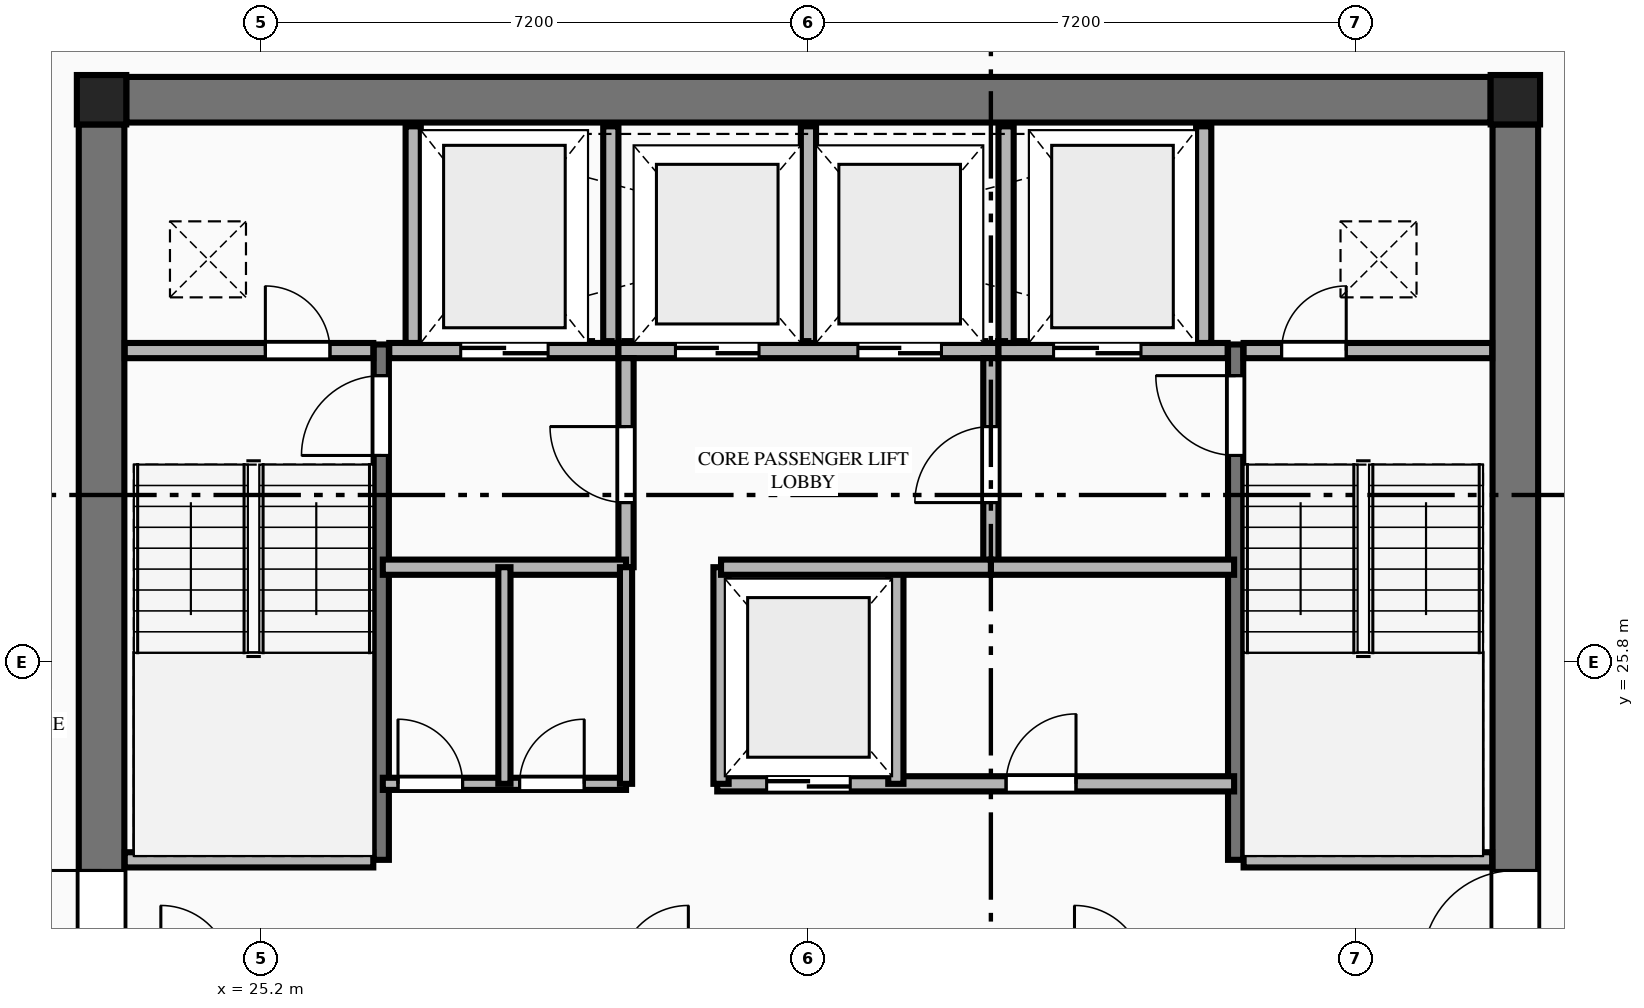
"""IFC4 building model, lengths in metres.
Left out: names, types, materials, properties, quantities, classifications, styles, units other than length and angle.
Written with IfcOpenShell. Run it as: python <this file> out.ifc"""

import sys

from ifc_helpers import new_model, si_unit, direction, frame, frame_2d, origin, origin_2d, place, context, subcontext, project, spatial, rectangle, extrude, element, fill, save


model = new_model("IFC4")
c1 = context("Model", 3, precision=1e-05, world=origin(), true_north=direction((0.0, 1.0)))
c2 = subcontext(c1, "Body", "Model", "MODEL_VIEW")
j1 = project(units=[si_unit("LENGTHUNIT", "METRE"), si_unit("PLANEANGLEUNIT", "RADIAN")], contexts=[c1])
p1 = place(None, origin())
s1 = spatial("IfcSite", under=j1, at=p1, CompositionType="ELEMENT")
p2 = place(p1, origin())
s2 = spatial("IfcBuilding", under=s1, at=p2, CompositionType="ELEMENT")
p3 = place(p2, frame((0.0, 0.0, 196.75)))
s3 = spatial("IfcBuildingStorey", under=s2, at=p3, CompositionType="ELEMENT", Elevation=196.75)
for number, where, z_axis, x_axis in (
    (1, (41.7, 33.2, 0.0), (0.0, 0.0, 1.0), (1.0, 0.0, 0.0)),
    (2, (23.1, 33.2, 0.0), (0.0, 0.0, 1.0), (1.0, 0.0, 0.0)),
):
    element("IfcColumn", number, at=place(p3, frame(where, z_axis=z_axis, x_axis=x_axis)), inside=s3, PredefinedType="COLUMN", context=c2, shape_type="SweptSolid", body=[
        extrude(rectangle(XDim=0.65, YDim=0.65, at=origin_2d()), origin(), (0.0, 0.0, 1.0), 3.55),
    ])
p4 = place(p3, frame((23.425, 33.2, 0.0), z_axis=(0.0, 0.0, 1.0), x_axis=(1.0, 0.0, 0.0)))
e3 = element("IfcWall", 3, at=p4, inside=s3, PredefinedType="SHEAR", context=c2, shape_type="SweptSolid", body=[
    extrude(rectangle(XDim=17.95, YDim=0.6, at=frame_2d((8.975, 0.0))), origin(), (0.0, 0.0, 1.0), 3.35),
])
p5 = place(p3, frame((23.1, 18.925, 0.0), z_axis=(0.0, 0.0, 1.0), x_axis=(0.0, 1.0, 0.0)))
e4 = element("IfcWall", 4, at=p5, inside=s3, PredefinedType="SHEAR", context=c2, shape_type="SweptSolid", body=[
    extrude(rectangle(XDim=13.95, YDim=0.6, at=frame_2d((6.975, 0.0))), origin(), (0.0, 0.0, 1.0), 3.35),
])
p6 = place(p5, frame((2.915, 0.0, 0.0)))
e5 = element("IfcOpeningElement", 5, at=p6, cuts=e4, PredefinedType="OPENING", context=c2, shape_type="SweptSolid", body=[
    extrude(rectangle(XDim=1.22, YDim=2.25, at=frame_2d((0.61, 1.125))), frame((0.0, 0.31, 0.0), z_axis=(0.0, -1.0, 0.0), x_axis=(1.0, 0.0, 0.0)), (0.0, 0.0, 1.0), 0.62),
])
p7 = place(p3, frame((41.7, 18.925, 0.0), z_axis=(0.0, 0.0, 1.0), x_axis=(0.0, 1.0, 0.0)))
e6 = element("IfcWall", 6, at=p7, inside=s3, PredefinedType="SHEAR", context=c2, shape_type="SweptSolid", body=[
    extrude(rectangle(XDim=13.95, YDim=0.6, at=frame_2d((6.975, 0.0))), origin(), (0.0, 0.0, 1.0), 3.35),
])
p8 = place(p7, frame((2.915, 0.0, 0.0)))
e7 = element("IfcOpeningElement", 7, at=p8, cuts=e6, PredefinedType="OPENING", context=c2, shape_type="SweptSolid", body=[
    extrude(rectangle(XDim=1.22, YDim=2.25, at=frame_2d((0.61, 1.125))), frame((0.0, 0.31, 0.0), z_axis=(0.0, -1.0, 0.0), x_axis=(1.0, 0.0, 0.0)), (0.0, 0.0, 1.0), 0.62),
])
p9 = place(p3, frame((26.78, 23.2, 0.0), z_axis=(0.0, 0.0, 1.0), x_axis=(0.0, 1.0, 0.0)))
e8 = element("IfcWall", 8, at=p9, inside=s3, PredefinedType="SHEAR", context=c2, shape_type="SweptSolid", body=[
    extrude(rectangle(XDim=6.78, YDim=0.2, at=frame_2d((3.39, 0.0))), origin(), (0.0, 0.0, 1.0), 3.55),
])
p10 = place(p9, frame((5.32, 0.0, 0.0)))
e9 = element("IfcOpeningElement", 9, at=p10, cuts=e8, PredefinedType="OPENING", context=c2, shape_type="SweptSolid", body=[
    extrude(rectangle(XDim=1.05, YDim=2.15, at=frame_2d((0.525, 1.075))), frame((0.0, 0.11, 0.0), z_axis=(0.0, -1.0, 0.0), x_axis=(1.0, 0.0, 0.0)), (0.0, 0.0, 1.0), 0.22),
])
p11 = place(p3, frame((23.405, 23.2, 0.0), z_axis=(0.0, 0.0, 1.0), x_axis=(1.0, 0.0, 0.0)))
e10 = element("IfcWall", 10, at=p11, inside=s3, PredefinedType="PLUMBINGWALL", context=c2, shape_type="SweptSolid", body=[
    extrude(rectangle(XDim=3.27, YDim=0.2, at=frame_2d((1.635, 0.0))), origin(), (0.0, 0.0, 1.0), 3.35),
])
p12 = place(p3, frame((38.02, 23.2, 0.0), z_axis=(0.0, 0.0, 1.0), x_axis=(0.0, 1.0, 0.0)))
e11 = element("IfcWall", 11, at=p12, inside=s3, PredefinedType="SHEAR", context=c2, shape_type="SweptSolid", body=[
    extrude(rectangle(XDim=6.78, YDim=0.2, at=frame_2d((3.39, 0.0))), origin(), (0.0, 0.0, 1.0), 3.55),
])
p13 = place(p12, frame((5.32, 0.0, 0.0)))
e12 = element("IfcOpeningElement", 12, at=p13, cuts=e11, PredefinedType="OPENING", context=c2, shape_type="SweptSolid", body=[
    extrude(rectangle(XDim=1.05, YDim=2.15, at=frame_2d((0.525, 1.075))), frame((0.0, 0.11, 0.0), z_axis=(0.0, -1.0, 0.0), x_axis=(1.0, 0.0, 0.0)), (0.0, 0.0, 1.0), 0.22),
])
p14 = place(p3, frame((38.125, 23.2, 0.0), z_axis=(0.0, 0.0, 1.0), x_axis=(1.0, 0.0, 0.0)))
e13 = element("IfcWall", 13, at=p14, inside=s3, PredefinedType="PLUMBINGWALL", context=c2, shape_type="SweptSolid", body=[
    extrude(rectangle(XDim=3.27, YDim=0.2, at=frame_2d((1.635, 0.0))), origin(), (0.0, 0.0, 1.0), 3.35),
])
p15 = place(p3, frame((23.405, 29.9, 0.0), z_axis=(0.0, 0.0, 1.0), x_axis=(1.0, 0.0, 0.0)))
e14 = element("IfcWall", 14, at=p15, inside=s3, PredefinedType="PLUMBINGWALL", context=c2, shape_type="SweptSolid", body=[
    extrude(rectangle(XDim=3.27, YDim=0.2, at=frame_2d((1.635, 0.0))), origin(), (0.0, 0.0, 1.0), 3.35),
])
p16 = place(p15, frame((1.85, 0.0, 0.0)))
e15 = element("IfcOpeningElement", 15, at=p16, cuts=e14, PredefinedType="OPENING", context=c2, shape_type="SweptSolid", body=[
    extrude(rectangle(XDim=0.85, YDim=2.05, at=frame_2d((0.425, 1.025))), frame((0.0, 0.11, 0.0), z_axis=(0.0, -1.0, 0.0), x_axis=(1.0, 0.0, 0.0)), (0.0, 0.0, 1.0), 0.22),
])
p17 = place(p3, frame((26.885, 29.9, 0.0), z_axis=(0.0, 0.0, 1.0), x_axis=(1.0, 0.0, 0.0)))
e16 = element("IfcWall", 16, at=p17, inside=s3, PredefinedType="PLUMBINGWALL", context=c2, shape_type="SweptSolid", body=[
    extrude(rectangle(XDim=3.015, YDim=0.2, at=frame_2d((1.507, 0.0))), origin(), (0.0, 0.0, 1.0), 3.35),
])
p18 = place(p17, frame((0.94, 0.0, 0.0)))
e17 = element("IfcOpeningElement", 17, at=p18, cuts=e16, PredefinedType="OPENING", context=c2, shape_type="SweptSolid", body=[
    extrude(rectangle(XDim=1.15, YDim=2.2, at=frame_2d((0.575, 1.1))), frame((0.0, 0.11, 0.0), z_axis=(0.0, -1.0, 0.0), x_axis=(1.0, 0.0, 0.0)), (0.0, 0.0, 1.0), 0.22),
])
p19 = place(p3, frame((29.9, 29.9, 0.0), z_axis=(0.0, 0.0, 1.0), x_axis=(1.0, 0.0, 0.0)))
e18 = element("IfcWall", 18, at=p19, inside=s3, PredefinedType="PLUMBINGWALL", context=c2, shape_type="SweptSolid", body=[
    extrude(rectangle(XDim=5.0, YDim=0.2, at=frame_2d((2.5, 0.0))), origin(), (0.0, 0.0, 1.0), 3.35),
])
p20 = place(p19, frame((0.75, 0.0, 0.0)))
e19 = element("IfcOpeningElement", 19, at=p20, cuts=e18, PredefinedType="OPENING", context=c2, shape_type="SweptSolid", body=[
    extrude(rectangle(XDim=1.1, YDim=2.2, at=frame_2d((0.55, 1.1))), frame((0.0, 0.11, 0.0), z_axis=(0.0, -1.0, 0.0), x_axis=(1.0, 0.0, 0.0)), (0.0, 0.0, 1.0), 0.22),
])
p21 = place(p19, frame((3.15, 0.0, 0.0)))
e20 = element("IfcOpeningElement", 20, at=p21, cuts=e18, PredefinedType="OPENING", context=c2, shape_type="SweptSolid", body=[
    extrude(rectangle(XDim=1.1, YDim=2.2, at=frame_2d((0.55, 1.1))), frame((0.0, 0.11, 0.0), z_axis=(0.0, -1.0, 0.0), x_axis=(1.0, 0.0, 0.0)), (0.0, 0.0, 1.0), 0.22),
])
p22 = place(p3, frame((34.9, 29.9, 0.0), z_axis=(0.0, 0.0, 1.0), x_axis=(1.0, 0.0, 0.0)))
e21 = element("IfcWall", 21, at=p22, inside=s3, PredefinedType="PLUMBINGWALL", context=c2, shape_type="SweptSolid", body=[
    extrude(rectangle(XDim=3.015, YDim=0.2, at=frame_2d((1.508, 0.0))), origin(), (0.0, 0.0, 1.0), 3.35),
])
p23 = place(p22, frame((0.725, 0.0, 0.0)))
e22 = element("IfcOpeningElement", 22, at=p23, cuts=e21, PredefinedType="OPENING", context=c2, shape_type="SweptSolid", body=[
    extrude(rectangle(XDim=1.15, YDim=2.2, at=frame_2d((0.575, 1.1))), frame((0.0, 0.11, 0.0), z_axis=(0.0, -1.0, 0.0), x_axis=(1.0, 0.0, 0.0)), (0.0, 0.0, 1.0), 0.22),
])
p24 = place(p3, frame((38.125, 29.9, 0.0), z_axis=(0.0, 0.0, 1.0), x_axis=(1.0, 0.0, 0.0)))
e23 = element("IfcWall", 23, at=p24, inside=s3, PredefinedType="PLUMBINGWALL", context=c2, shape_type="SweptSolid", body=[
    extrude(rectangle(XDim=3.27, YDim=0.2, at=frame_2d((1.635, 0.0))), origin(), (0.0, 0.0, 1.0), 3.35),
])
p25 = place(p24, frame((0.5, 0.0, 0.0)))
e24 = element("IfcOpeningElement", 24, at=p25, cuts=e23, PredefinedType="OPENING", context=c2, shape_type="SweptSolid", body=[
    extrude(rectangle(XDim=0.85, YDim=2.05, at=frame_2d((0.425, 1.025))), frame((0.0, 0.11, 0.0), z_axis=(0.0, -1.0, 0.0), x_axis=(1.0, 0.0, 0.0)), (0.0, 0.0, 1.0), 0.22),
])
for number, where, z_axis, x_axis in (
    (25, (27.2, 30.0, 0.0), (0.0, 0.0, 1.0), (0.0, 1.0, 0.0)),
    (26, (29.8, 30.0, 0.0), (0.0, 0.0, 1.0), (0.0, 1.0, 0.0)),
    (27, (32.4, 30.0, 0.0), (0.0, 0.0, 1.0), (0.0, 1.0, 0.0)),
    (28, (35.0, 30.0, 0.0), (0.0, 0.0, 1.0), (0.0, 1.0, 0.0)),
    (29, (37.6, 30.0, 0.0), (0.0, 0.0, 1.0), (0.0, 1.0, 0.0)),
):
    element("IfcWall", number, at=place(p3, frame(where, z_axis=z_axis, x_axis=x_axis)), inside=s3, PredefinedType="PLUMBINGWALL", context=c2, shape_type="SweptSolid", body=[
        extrude(rectangle(XDim=2.85, YDim=0.2, at=frame_2d((1.425, 0.0))), origin(), (0.0, 0.0, 1.0), 3.35),
    ])
p26 = place(p3, frame((30.0, 27.05, 0.0), z_axis=(0.0, 0.0, 1.0), x_axis=(0.0, 1.0, 0.0)))
e30 = element("IfcWall", 30, at=p26, inside=s3, PredefinedType="PLUMBINGWALL", context=c2, shape_type="SweptSolid", body=[
    extrude(rectangle(XDim=2.75, YDim=0.2, at=frame_2d((1.375, 0.0))), origin(), (0.0, 0.0, 1.0), 3.35),
])
p27 = place(p26, frame((0.85, 0.0, 0.0)))
e31 = element("IfcOpeningElement", 31, at=p27, cuts=e30, PredefinedType="OPENING", context=c2, shape_type="SweptSolid", body=[
    extrude(rectangle(XDim=1.0, YDim=2.15, at=frame_2d((0.5, 1.075))), frame((0.0, 0.11, 0.0), z_axis=(0.0, -1.0, 0.0), x_axis=(1.0, 0.0, 0.0)), (0.0, 0.0, 1.0), 0.22),
])
p28 = place(p3, frame((26.8, 27.05, 0.0), z_axis=(0.0, 0.0, 1.0), x_axis=(1.0, 0.0, 0.0)))
e32 = element("IfcWall", 32, at=p28, inside=s3, PredefinedType="PLUMBINGWALL", context=c2, shape_type="SweptSolid", body=[
    extrude(rectangle(XDim=3.2, YDim=0.2, at=frame_2d((1.6, 0.0))), origin(), (0.0, 0.0, 1.0), 3.35),
])
p29 = place(p3, frame((34.8, 27.05, 0.0), z_axis=(0.0, 0.0, 1.0), x_axis=(0.0, 1.0, 0.0)))
e33 = element("IfcWall", 33, at=p29, inside=s3, PredefinedType="PLUMBINGWALL", context=c2, shape_type="SweptSolid", body=[
    extrude(rectangle(XDim=2.75, YDim=0.2, at=frame_2d((1.375, 0.0))), origin(), (0.0, 0.0, 1.0), 3.35),
])
p30 = place(p29, frame((0.85, 0.0, 0.0)))
e34 = element("IfcOpeningElement", 34, at=p30, cuts=e33, PredefinedType="OPENING", context=c2, shape_type="SweptSolid", body=[
    extrude(rectangle(XDim=1.0, YDim=2.15, at=frame_2d((0.5, 1.075))), frame((0.0, 0.11, 0.0), z_axis=(0.0, -1.0, 0.0), x_axis=(1.0, 0.0, 0.0)), (0.0, 0.0, 1.0), 0.22),
])
p31 = place(p3, frame((34.8, 27.05, 0.0), z_axis=(0.0, 0.0, 1.0), x_axis=(1.0, 0.0, 0.0)))
e35 = element("IfcWall", 35, at=p31, inside=s3, PredefinedType="PLUMBINGWALL", context=c2, shape_type="SweptSolid", body=[
    extrude(rectangle(XDim=3.2, YDim=0.2, at=frame_2d((1.6, 0.0))), origin(), (0.0, 0.0, 1.0), 3.35),
])
p32 = place(p3, frame((26.8, 24.2, 0.0), z_axis=(0.0, 0.0, 1.0), x_axis=(1.0, 0.0, 0.0)))
e36 = element("IfcWall", 36, at=p32, inside=s3, PredefinedType="PARTITIONING", context=c2, shape_type="SweptSolid", body=[
    extrude(rectangle(XDim=3.2, YDim=0.16, at=frame_2d((1.6, 0.0))), origin(), (0.0, 0.0, 1.0), 3.35),
])
p33 = place(p32, frame((0.2, 0.0, 0.0)))
e37 = element("IfcOpeningElement", 37, at=p33, cuts=e36, PredefinedType="OPENING", context=c2, shape_type="SweptSolid", body=[
    extrude(rectangle(XDim=0.85, YDim=2.05, at=frame_2d((0.425, 1.025))), frame((0.0, 0.09, 0.0), z_axis=(0.0, -1.0, 0.0), x_axis=(1.0, 0.0, 0.0)), (0.0, 0.0, 1.0), 0.18),
])
p34 = place(p32, frame((1.8, 0.0, 0.0)))
e38 = element("IfcOpeningElement", 38, at=p34, cuts=e36, PredefinedType="OPENING", context=c2, shape_type="SweptSolid", body=[
    extrude(rectangle(XDim=0.85, YDim=2.05, at=frame_2d((0.425, 1.025))), frame((0.0, 0.09, 0.0), z_axis=(0.0, -1.0, 0.0), x_axis=(1.0, 0.0, 0.0)), (0.0, 0.0, 1.0), 0.18),
])
p35 = place(p3, frame((30.0, 24.2, 0.0), z_axis=(0.0, 0.0, 1.0), x_axis=(0.0, 1.0, 0.0)))
e39 = element("IfcWall", 39, at=p35, inside=s3, PredefinedType="PARTITIONING", context=c2, shape_type="SweptSolid", body=[
    extrude(rectangle(XDim=2.85, YDim=0.16, at=frame_2d((1.425, 0.0))), origin(), (0.0, 0.0, 1.0), 3.35),
])
p36 = place(p3, frame((31.2, 24.2, 0.0), z_axis=(0.0, 0.0, 1.0), x_axis=(1.0, 0.0, 0.0)))
e40 = element("IfcWall", 40, at=p36, inside=s3, PredefinedType="PLUMBINGWALL", context=c2, shape_type="SweptSolid", body=[
    extrude(rectangle(XDim=6.8, YDim=0.2, at=frame_2d((3.4, 0.0))), origin(), (0.0, 0.0, 1.0), 3.35),
])
p37 = place(p36, frame((0.65, 0.0, 0.0)))
e41 = element("IfcOpeningElement", 41, at=p37, cuts=e40, PredefinedType="OPENING", context=c2, shape_type="SweptSolid", body=[
    extrude(rectangle(XDim=1.1, YDim=2.2, at=frame_2d((0.55, 1.1))), frame((0.0, 0.11, 0.0), z_axis=(0.0, -1.0, 0.0), x_axis=(1.0, 0.0, 0.0)), (0.0, 0.0, 1.0), 0.22),
])
p38 = place(p36, frame((3.8, 0.0, 0.0)))
e42 = element("IfcOpeningElement", 42, at=p38, cuts=e40, PredefinedType="OPENING", context=c2, shape_type="SweptSolid", body=[
    extrude(rectangle(XDim=0.92, YDim=2.15, at=frame_2d((0.46, 1.075))), frame((0.0, 0.11, 0.0), z_axis=(0.0, -1.0, 0.0), x_axis=(1.0, 0.0, 0.0)), (0.0, 0.0, 1.0), 0.22),
])
for number, where, z_axis, x_axis in (
    (43, (31.25, 24.2, 0.0), (0.0, 0.0, 1.0), (0.0, 1.0, 0.0)),
    (44, (33.55, 24.2, 0.0), (0.0, 0.0, 1.0), (0.0, 1.0, 0.0)),
):
    element("IfcWall", number, at=place(p3, frame(where, z_axis=z_axis, x_axis=x_axis)), inside=s3, PredefinedType="PLUMBINGWALL", context=c2, shape_type="SweptSolid", body=[
        extrude(rectangle(XDim=2.85, YDim=0.2, at=frame_2d((1.425, 0.0))), origin(), (0.0, 0.0, 1.0), 3.35),
    ])
p39 = place(p3, frame((31.25, 27.05, 0.0), z_axis=(0.0, 0.0, 1.0), x_axis=(1.0, 0.0, 0.0)))
e45 = element("IfcWall", 45, at=p39, inside=s3, PredefinedType="PLUMBINGWALL", context=c2, shape_type="SweptSolid", body=[
    extrude(rectangle(XDim=3.55, YDim=0.2, at=frame_2d((1.775, 0.0))), origin(), (0.0, 0.0, 1.0), 3.35),
])
p40 = place(p3, frame((28.4, 24.2, 0.0), z_axis=(0.0, 0.0, 1.0), x_axis=(0.0, 1.0, 0.0)))
e46 = element("IfcWall", 46, at=p40, inside=s3, PredefinedType="PARTITIONING", context=c2, shape_type="SweptSolid", body=[
    extrude(rectangle(XDim=2.85, YDim=0.16, at=frame_2d((1.425, 0.0))), origin(), (0.0, 0.0, 1.0), 3.35),
])
p41 = place(p6, origin())
e47 = element("IfcDoor", 47, at=p41, inside=s3, OperationType="SINGLE_SWING_RIGHT", PredefinedType="DOOR", context=c2, shape_type="SweptSolid", body=[
    extrude(rectangle(XDim=1.22, YDim=2.25, at=frame_2d((0.61, 1.125))), frame((0.0, 0.025, 0.0), z_axis=(0.0, -1.0, 0.0), x_axis=(1.0, 0.0, 0.0)), (0.0, 0.0, 1.0), 0.05),
])
fill(e5, e47)
p42 = place(p8, origin())
e48 = element("IfcDoor", 48, at=p42, inside=s3, OperationType="SINGLE_SWING_LEFT", PredefinedType="DOOR", context=c2, shape_type="SweptSolid", body=[
    extrude(rectangle(XDim=1.22, YDim=2.25, at=frame_2d((0.61, 1.125))), frame((0.0, 0.025, 0.0), z_axis=(0.0, -1.0, 0.0), x_axis=(1.0, 0.0, 0.0)), (0.0, 0.0, 1.0), 0.05),
])
fill(e7, e48)
p43 = place(p10, origin())
e49 = element("IfcDoor", 49, at=p43, inside=s3, OperationType="SINGLE_SWING_LEFT", PredefinedType="DOOR", context=c2, shape_type="SweptSolid", body=[
    extrude(rectangle(XDim=1.05, YDim=2.15, at=frame_2d((0.525, 1.075))), frame((0.0, 0.025, 0.0), z_axis=(0.0, -1.0, 0.0), x_axis=(1.0, 0.0, 0.0)), (0.0, 0.0, 1.0), 0.05),
])
fill(e9, e49)
p44 = place(p13, origin())
e50 = element("IfcDoor", 50, at=p44, inside=s3, OperationType="SINGLE_SWING_RIGHT", PredefinedType="DOOR", context=c2, shape_type="SweptSolid", body=[
    extrude(rectangle(XDim=1.05, YDim=2.15, at=frame_2d((0.525, 1.075))), frame((0.0, 0.025, 0.0), z_axis=(0.0, -1.0, 0.0), x_axis=(1.0, 0.0, 0.0)), (0.0, 0.0, 1.0), 0.05),
])
fill(e12, e50)
p45 = place(p16, origin())
e51 = element("IfcDoor", 51, at=p45, inside=s3, OperationType="SINGLE_SWING_LEFT", PredefinedType="DOOR", context=c2, shape_type="SweptSolid", body=[
    extrude(rectangle(XDim=0.85, YDim=2.05, at=frame_2d((0.425, 1.025))), frame((0.0, 0.025, 0.0), z_axis=(0.0, -1.0, 0.0), x_axis=(1.0, 0.0, 0.0)), (0.0, 0.0, 1.0), 0.05),
])
fill(e15, e51)
p46 = place(p25, origin())
e52 = element("IfcDoor", 52, at=p46, inside=s3, OperationType="SINGLE_SWING_RIGHT", PredefinedType="DOOR", context=c2, shape_type="SweptSolid", body=[
    extrude(rectangle(XDim=0.85, YDim=2.05, at=frame_2d((0.425, 1.025))), frame((0.0, 0.025, 0.0), z_axis=(0.0, -1.0, 0.0), x_axis=(1.0, 0.0, 0.0)), (0.0, 0.0, 1.0), 0.05),
])
fill(e24, e52)
p47 = place(p18, origin())
e53 = element("IfcDoor", 53, at=p47, inside=s3, OperationType="DOUBLE_DOOR_SLIDING", PredefinedType="DOOR", context=c2, shape_type="SweptSolid", body=[
    extrude(rectangle(XDim=1.15, YDim=2.2, at=frame_2d((0.575, 1.1))), frame((0.0, 0.025, 0.0), z_axis=(0.0, -1.0, 0.0), x_axis=(1.0, 0.0, 0.0)), (0.0, 0.0, 1.0), 0.05),
])
fill(e17, e53)
p48 = place(p23, origin())
e54 = element("IfcDoor", 54, at=p48, inside=s3, OperationType="DOUBLE_DOOR_SLIDING", PredefinedType="DOOR", context=c2, shape_type="SweptSolid", body=[
    extrude(rectangle(XDim=1.15, YDim=2.2, at=frame_2d((0.575, 1.1))), frame((0.0, 0.025, 0.0), z_axis=(0.0, -1.0, 0.0), x_axis=(1.0, 0.0, 0.0)), (0.0, 0.0, 1.0), 0.05),
])
fill(e22, e54)
p49 = place(p20, origin())
e55 = element("IfcDoor", 55, at=p49, inside=s3, OperationType="DOUBLE_DOOR_SLIDING", PredefinedType="DOOR", context=c2, shape_type="SweptSolid", body=[
    extrude(rectangle(XDim=1.1, YDim=2.2, at=frame_2d((0.55, 1.1))), frame((0.0, 0.025, 0.0), z_axis=(0.0, -1.0, 0.0), x_axis=(1.0, 0.0, 0.0)), (0.0, 0.0, 1.0), 0.05),
])
fill(e19, e55)
p50 = place(p21, origin())
e56 = element("IfcDoor", 56, at=p50, inside=s3, OperationType="DOUBLE_DOOR_SLIDING", PredefinedType="DOOR", context=c2, shape_type="SweptSolid", body=[
    extrude(rectangle(XDim=1.1, YDim=2.2, at=frame_2d((0.55, 1.1))), frame((0.0, 0.025, 0.0), z_axis=(0.0, -1.0, 0.0), x_axis=(1.0, 0.0, 0.0)), (0.0, 0.0, 1.0), 0.05),
])
fill(e20, e56)
p51 = place(p27, origin())
e57 = element("IfcDoor", 57, at=p51, inside=s3, OperationType="SINGLE_SWING_RIGHT", PredefinedType="DOOR", context=c2, shape_type="SweptSolid", body=[
    extrude(rectangle(XDim=1.0, YDim=2.15, at=frame_2d((0.5, 1.075))), frame((0.0, 0.025, 0.0), z_axis=(0.0, -1.0, 0.0), x_axis=(1.0, 0.0, 0.0)), (0.0, 0.0, 1.0), 0.05),
])
fill(e31, e57)
p52 = place(p30, origin())
e58 = element("IfcDoor", 58, at=p52, inside=s3, OperationType="SINGLE_SWING_LEFT", PredefinedType="DOOR", context=c2, shape_type="SweptSolid", body=[
    extrude(rectangle(XDim=1.0, YDim=2.15, at=frame_2d((0.5, 1.075))), frame((0.0, 0.025, 0.0), z_axis=(0.0, -1.0, 0.0), x_axis=(1.0, 0.0, 0.0)), (0.0, 0.0, 1.0), 0.05),
])
fill(e34, e58)
p53 = place(p37, origin())
e59 = element("IfcDoor", 59, at=p53, inside=s3, OperationType="DOUBLE_DOOR_SLIDING", PredefinedType="DOOR", context=c2, shape_type="SweptSolid", body=[
    extrude(rectangle(XDim=1.1, YDim=2.2, at=frame_2d((0.55, 1.1))), frame((0.0, 0.025, 0.0), z_axis=(0.0, -1.0, 0.0), x_axis=(1.0, 0.0, 0.0)), (0.0, 0.0, 1.0), 0.05),
])
fill(e41, e59)
p54 = place(p33, origin())
e60 = element("IfcDoor", 60, at=p54, inside=s3, OperationType="SINGLE_SWING_LEFT", PredefinedType="DOOR", context=c2, shape_type="SweptSolid", body=[
    extrude(rectangle(XDim=0.85, YDim=2.05, at=frame_2d((0.425, 1.025))), frame((0.0, 0.025, 0.0), z_axis=(0.0, -1.0, 0.0), x_axis=(1.0, 0.0, 0.0)), (0.0, 0.0, 1.0), 0.05),
])
fill(e37, e60)
p55 = place(p34, origin())
e61 = element("IfcDoor", 61, at=p55, inside=s3, OperationType="SINGLE_SWING_RIGHT", PredefinedType="DOOR", context=c2, shape_type="SweptSolid", body=[
    extrude(rectangle(XDim=0.85, YDim=2.05, at=frame_2d((0.425, 1.025))), frame((0.0, 0.025, 0.0), z_axis=(0.0, -1.0, 0.0), x_axis=(1.0, 0.0, 0.0)), (0.0, 0.0, 1.0), 0.05),
])
fill(e38, e61)
p56 = place(p38, origin())
e62 = element("IfcDoor", 62, at=p56, inside=s3, OperationType="SINGLE_SWING_RIGHT", PredefinedType="DOOR", context=c2, shape_type="SweptSolid", body=[
    extrude(rectangle(XDim=0.92, YDim=2.15, at=frame_2d((0.46, 1.075))), frame((0.0, 0.025, 0.0), z_axis=(0.0, -1.0, 0.0), x_axis=(1.0, 0.0, 0.0)), (0.0, 0.0, 1.0), 0.05),
])
fill(e42, e62)
save(model, sys.argv[1])
